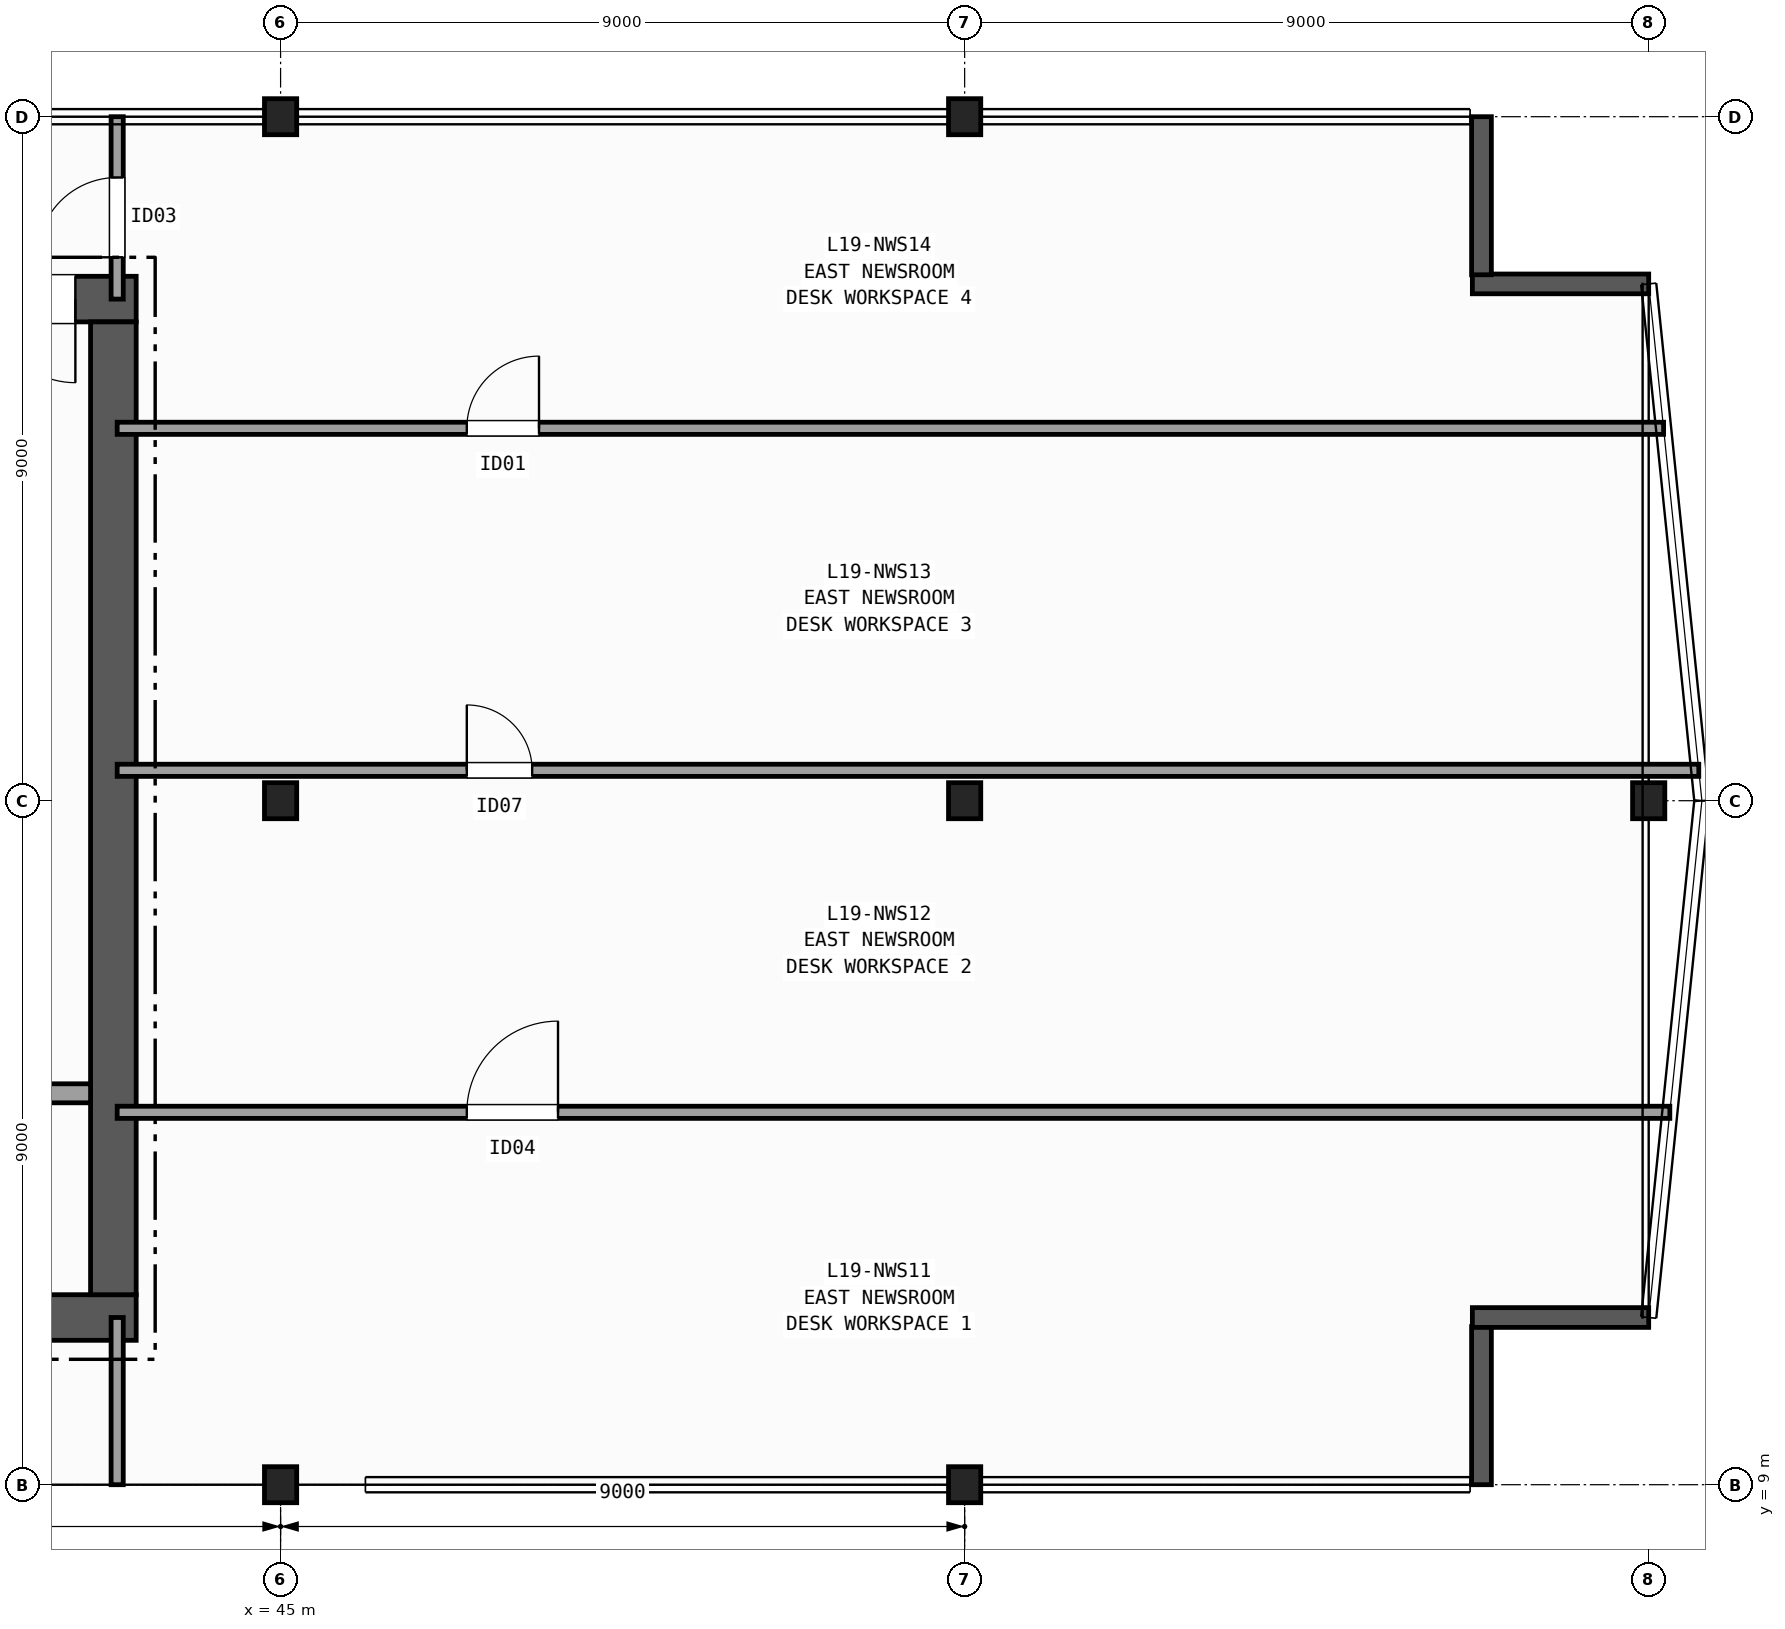
"""IFC4 building model, lengths in metres.
Left out: names, types, materials, properties, quantities, classifications, styles, units other than length and angle.
Written with IfcOpenShell. Run it as: python <this file> out.ifc"""

import sys

from ifc_helpers import new_model, si_unit, direction, frame, frame_2d, origin, origin_2d, place, context, subcontext, project, spatial, rectangle, i_section, extrude, element, fill, save


model = new_model("IFC4")
c1 = context("Model", 3, precision=1e-05, world=origin(), true_north=direction((0.0, 1.0)))
c2 = subcontext(c1, "Body", "Model", "MODEL_VIEW")
j1 = project(units=[si_unit("LENGTHUNIT", "METRE"), si_unit("PLANEANGLEUNIT", "RADIAN")], contexts=[c1])
p1 = place(None, origin())
s1 = spatial("IfcSite", under=j1, at=p1, CompositionType="ELEMENT")
p2 = place(p1, origin())
s2 = spatial("IfcBuilding", under=s1, at=p2, CompositionType="ELEMENT")
p3 = place(p2, frame((0.0, 0.0, 80.4)))
s3 = spatial("IfcBuildingStorey", under=s2, at=p3, CompositionType="ELEMENT", Elevation=80.4)
for number, where, z_axis, x_axis in (
    (1, (45.0, 9.0, 0.0), (0.0, 0.0, 1.0), (1.0, 0.0, 0.0)),
    (2, (45.0, 18.0, 0.0), (0.0, 0.0, 1.0), (1.0, 0.0, 0.0)),
    (3, (45.0, 27.0, 0.0), (0.0, 0.0, 1.0), (1.0, 0.0, 0.0)),
    (4, (54.0, 9.0, 0.0), (0.0, 0.0, 1.0), (1.0, 0.0, 0.0)),
    (5, (54.0, 18.0, 0.0), (0.0, 0.0, 1.0), (1.0, 0.0, 0.0)),
    (6, (54.0, 27.0, 0.0), (0.0, 0.0, 1.0), (1.0, 0.0, 0.0)),
    (7, (63.0, 18.0, 0.0), (0.0, 0.0, 1.0), (1.0, 0.0, 0.0)),
):
    element("IfcColumn", number, at=place(p3, frame(where, z_axis=z_axis, x_axis=x_axis)), inside=s3, PredefinedType="COLUMN", context=c2, shape_type="SweptSolid", body=[
        extrude(i_section(OverallWidth=0.424, OverallDepth=0.474, WebThickness=0.048, FlangeThickness=0.077, FilletRadius=0.015, at=origin_2d()), origin(), (0.0, 0.0, 1.0), 3.7),
    ])
p4 = place(p3, frame((60.8, 9.0, 0.0), z_axis=(0.0, 0.0, 1.0), x_axis=(0.0, 1.0, 0.0)))
e8 = element("IfcWall", 8, at=p4, inside=s3, PredefinedType="SOLIDWALL", context=c2, shape_type="SweptSolid", body=[
    extrude(rectangle(XDim=2.08, YDim=0.26, at=frame_2d((1.04, 0.0))), origin(), (0.0, 0.0, 1.0), 3.37),
])
for number, where, z_axis, x_axis in (
    (9, (60.68, 11.2, 0.0), (0.0, 0.0, 1.0), (1.0, 0.0, 0.0)),
    (10, (63.0, 24.8, 0.0), (0.0, 0.0, 1.0), (-1.0, 0.0, 0.0)),
):
    element("IfcWall", number, at=place(p3, frame(where, z_axis=z_axis, x_axis=x_axis)), inside=s3, PredefinedType="SOLIDWALL", context=c2, shape_type="SweptSolid", body=[
        extrude(rectangle(XDim=2.32, YDim=0.26, at=frame_2d((1.16, 0.0))), origin(), (0.0, 0.0, 1.0), 3.37),
    ])
p5 = place(p3, frame((60.8, 24.92, 0.0), z_axis=(0.0, 0.0, 1.0), x_axis=(0.0, 1.0, 0.0)))
e11 = element("IfcWall", 11, at=p5, inside=s3, PredefinedType="SOLIDWALL", context=c2, shape_type="SweptSolid", body=[
    extrude(rectangle(XDim=2.08, YDim=0.26, at=frame_2d((1.04, 0.0))), origin(), (0.0, 0.0, 1.0), 3.37),
])
p6 = place(p3, frame((29.1, 11.2, 0.0), z_axis=(0.0, 0.0, 1.0), x_axis=(1.0, 0.0, 0.0)))
e12 = element("IfcWall", 12, at=p6, inside=s3, PredefinedType="SHEAR", context=c2, shape_type="SweptSolid", body=[
    extrude(rectangle(XDim=14.0, YDim=0.6, at=frame_2d((7.0, 0.0))), origin(), (0.0, 0.0, 1.0), 3.37),
])
p7 = place(p3, frame((43.1, 24.6, 0.0), z_axis=(0.0, 0.0, 1.0), x_axis=(-1.0, 0.0, 0.0)))
e13 = element("IfcWall", 13, at=p7, inside=s3, PredefinedType="SHEAR", context=c2, shape_type="SweptSolid", body=[
    extrude(rectangle(XDim=14.0, YDim=0.6, at=frame_2d((7.0, 0.0))), origin(), (0.0, 0.0, 1.0), 3.37),
])
p8 = place(p7, frame((0.8, 0.0, 0.0)))
e14 = element("IfcOpeningElement", 14, at=p8, cuts=e13, PredefinedType="OPENING", context=c2, shape_type="SweptSolid", body=[
    extrude(rectangle(XDim=1.1, YDim=2.15, at=frame_2d((0.55, 1.075))), frame((0.0, 0.31, 0.0), z_axis=(0.0, -1.0, 0.0), x_axis=(1.0, 0.0, 0.0)), (0.0, 0.0, 1.0), 0.62),
])
p9 = place(p7, frame((2.75, 0.0, 0.0)))
e15 = element("IfcOpeningElement", 15, at=p9, cuts=e13, PredefinedType="OPENING", context=c2, shape_type="SweptSolid", body=[
    extrude(rectangle(XDim=0.9, YDim=2.1, at=frame_2d((0.45, 1.05))), frame((0.0, 0.31, 0.0), z_axis=(0.0, -1.0, 0.0), x_axis=(1.0, 0.0, 0.0)), (0.0, 0.0, 1.0), 0.62),
])
p10 = place(p7, frame((4.65, 0.0, 0.0)))
e16 = element("IfcOpeningElement", 16, at=p10, cuts=e13, PredefinedType="OPENING", context=c2, shape_type="SweptSolid", body=[
    extrude(rectangle(XDim=0.9, YDim=2.1, at=frame_2d((0.45, 1.05))), frame((0.0, 0.31, 0.0), z_axis=(0.0, -1.0, 0.0), x_axis=(1.0, 0.0, 0.0)), (0.0, 0.0, 1.0), 0.62),
])
p11 = place(p3, frame((42.8, 11.5, 0.0), z_axis=(0.0, 0.0, 1.0), x_axis=(0.0, 1.0, 0.0)))
e17 = element("IfcWall", 17, at=p11, inside=s3, PredefinedType="SHEAR", context=c2, shape_type="SweptSolid", body=[
    extrude(rectangle(XDim=12.8, YDim=0.6, at=frame_2d((6.4, 0.0))), origin(), (0.0, 0.0, 1.0), 3.37),
])
p12 = place(p3, frame((33.07, 14.15, 0.0), z_axis=(0.0, 0.0, 1.0), x_axis=(1.0, 0.0, 0.0)))
e18 = element("IfcWall", 18, at=p12, inside=s3, PredefinedType="PARTITIONING", context=c2, shape_type="SweptSolid", body=[
    extrude(rectangle(XDim=9.43, YDim=0.25, at=frame_2d((4.715, 0.0))), origin(), (0.0, 0.0, 1.0), 3.37),
])
p13 = place(p12, frame((0.755, 0.0, 0.0)))
e19 = element("IfcOpeningElement", 19, at=p13, cuts=e18, PredefinedType="OPENING", context=c2, shape_type="SweptSolid", body=[
    extrude(rectangle(XDim=1.15, YDim=2.15, at=frame_2d((0.575, 1.075))), frame((0.0, 0.135, 0.0), z_axis=(0.0, -1.0, 0.0), x_axis=(1.0, 0.0, 0.0)), (0.0, 0.0, 1.0), 0.27),
])
p14 = place(p12, frame((3.355, 0.0, 0.0)))
e20 = element("IfcOpeningElement", 20, at=p14, cuts=e18, PredefinedType="OPENING", context=c2, shape_type="SweptSolid", body=[
    extrude(rectangle(XDim=1.15, YDim=2.15, at=frame_2d((0.575, 1.075))), frame((0.0, 0.135, 0.0), z_axis=(0.0, -1.0, 0.0), x_axis=(1.0, 0.0, 0.0)), (0.0, 0.0, 1.0), 0.27),
])
p15 = place(p3, frame((42.85, 9.0, 0.0), z_axis=(0.0, 0.0, 1.0), x_axis=(0.0, 1.0, 0.0)))
e21 = element("IfcWall", 21, at=p15, inside=s3, PredefinedType="PARTITIONING", context=c2, shape_type="SweptSolid", body=[
    extrude(rectangle(XDim=2.2, YDim=0.16, at=frame_2d((1.1, 0.0))), origin(), (0.0, 0.0, 1.0), 2.577),
])
p16 = place(p3, frame((42.85, 24.6, 0.0), z_axis=(0.0, 0.0, 1.0), x_axis=(0.0, 1.0, 0.0)))
e22 = element("IfcWall", 22, at=p16, inside=s3, PredefinedType="PARTITIONING", context=c2, shape_type="SweptSolid", body=[
    extrude(rectangle(XDim=2.4, YDim=0.16, at=frame_2d((1.2, 0.0))), origin(), (0.0, 0.0, 1.0), 2.577),
])
p17 = place(p16, frame((0.55, 0.0, 0.0)))
e23 = element("IfcOpeningElement", 23, at=p17, cuts=e22, PredefinedType="OPENING", context=c2, shape_type="SweptSolid", body=[
    extrude(rectangle(XDim=1.05, YDim=2.15, at=frame_2d((0.525, 1.075))), frame((0.0, 0.09, 0.0), z_axis=(0.0, -1.0, 0.0), x_axis=(1.0, 0.0, 0.0)), (0.0, 0.0, 1.0), 0.18),
])
p18 = place(p3, frame((42.85, 13.9, 0.0), z_axis=(0.0, 0.0, 1.0), x_axis=(1.0, 0.0, 0.0)))
e24 = element("IfcWall", 24, at=p18, inside=s3, PredefinedType="PARTITIONING", context=c2, shape_type="SweptSolid", body=[
    extrude(rectangle(XDim=20.428, YDim=0.16, at=frame_2d((10.214, 0.0))), origin(), (0.0, 0.0, 1.0), 2.742),
])
p19 = place(p18, frame((4.6, 0.0, 0.0)))
e25 = element("IfcOpeningElement", 25, at=p19, cuts=e24, PredefinedType="OPENING", context=c2, shape_type="SweptSolid", body=[
    extrude(rectangle(XDim=1.2, YDim=2.15, at=frame_2d((0.6, 1.075))), frame((0.0, 0.09, 0.0), z_axis=(0.0, -1.0, 0.0), x_axis=(1.0, 0.0, 0.0)), (0.0, 0.0, 1.0), 0.18),
])
p20 = place(p3, frame((42.85, 18.4, 0.0), z_axis=(0.0, 0.0, 1.0), x_axis=(1.0, 0.0, 0.0)))
e26 = element("IfcWall", 26, at=p20, inside=s3, PredefinedType="PARTITIONING", context=c2, shape_type="SweptSolid", body=[
    extrude(rectangle(XDim=20.809, YDim=0.16, at=frame_2d((10.404, 0.0))), origin(), (0.0, 0.0, 1.0), 2.739),
])
p21 = place(p20, frame((4.6, 0.0, 0.0)))
e27 = element("IfcOpeningElement", 27, at=p21, cuts=e26, PredefinedType="OPENING", context=c2, shape_type="SweptSolid", body=[
    extrude(rectangle(XDim=0.86, YDim=2.05, at=frame_2d((0.43, 1.025))), frame((0.0, 0.09, 0.0), z_axis=(0.0, -1.0, 0.0), x_axis=(1.0, 0.0, 0.0)), (0.0, 0.0, 1.0), 0.18),
])
p22 = place(p3, frame((42.85, 22.9, 0.0), z_axis=(0.0, 0.0, 1.0), x_axis=(1.0, 0.0, 0.0)))
e28 = element("IfcWall", 28, at=p22, inside=s3, PredefinedType="PARTITIONING", context=c2, shape_type="SweptSolid", body=[
    extrude(rectangle(XDim=20.346, YDim=0.16, at=frame_2d((10.173, 0.0))), origin(), (0.0, 0.0, 1.0), 2.739),
])
p23 = place(p22, frame((4.6, 0.0, 0.0)))
e29 = element("IfcOpeningElement", 29, at=p23, cuts=e28, PredefinedType="OPENING", context=c2, shape_type="SweptSolid", body=[
    extrude(rectangle(XDim=0.95, YDim=2.1, at=frame_2d((0.475, 1.05))), frame((0.0, 0.09, 0.0), z_axis=(0.0, -1.0, 0.0), x_axis=(1.0, 0.0, 0.0)), (0.0, 0.0, 1.0), 0.18),
])
p24 = place(p8, origin())
e30 = element("IfcDoor", 30, at=p24, inside=s3, OperationType="SINGLE_SWING_LEFT", PredefinedType="DOOR", context=c2, shape_type="SweptSolid", body=[
    extrude(rectangle(XDim=1.1, YDim=2.15, at=frame_2d((0.55, 1.075))), frame((0.0, 0.025, 0.0), z_axis=(0.0, -1.0, 0.0), x_axis=(1.0, 0.0, 0.0)), (0.0, 0.0, 1.0), 0.05),
])
fill(e14, e30)
p25 = place(p17, origin())
e31 = element("IfcDoor", 31, at=p25, inside=s3, OperationType="SINGLE_SWING_LEFT", PredefinedType="DOOR", context=c2, shape_type="SweptSolid", body=[
    extrude(rectangle(XDim=1.05, YDim=2.15, at=frame_2d((0.525, 1.075))), frame((0.0, 0.025, 0.0), z_axis=(0.0, -1.0, 0.0), x_axis=(1.0, 0.0, 0.0)), (0.0, 0.0, 1.0), 0.05),
])
fill(e23, e31)
p26 = place(p19, origin())
e32 = element("IfcDoor", 32, at=p26, inside=s3, OperationType="SINGLE_SWING_RIGHT", PredefinedType="DOOR", context=c2, shape_type="SweptSolid", body=[
    extrude(rectangle(XDim=1.2, YDim=2.15, at=frame_2d((0.6, 1.075))), frame((0.0, 0.025, 0.0), z_axis=(0.0, -1.0, 0.0), x_axis=(1.0, 0.0, 0.0)), (0.0, 0.0, 1.0), 0.05),
])
fill(e25, e32)
p27 = place(p21, origin())
e33 = element("IfcDoor", 33, at=p27, inside=s3, OperationType="SINGLE_SWING_LEFT", PredefinedType="DOOR", context=c2, shape_type="SweptSolid", body=[
    extrude(rectangle(XDim=0.86, YDim=2.05, at=frame_2d((0.43, 1.025))), frame((0.0, 0.025, 0.0), z_axis=(0.0, -1.0, 0.0), x_axis=(1.0, 0.0, 0.0)), (0.0, 0.0, 1.0), 0.05),
])
fill(e27, e33)
p28 = place(p23, origin())
e34 = element("IfcDoor", 34, at=p28, inside=s3, OperationType="SINGLE_SWING_RIGHT", PredefinedType="DOOR", context=c2, shape_type="SweptSolid", body=[
    extrude(rectangle(XDim=0.95, YDim=2.1, at=frame_2d((0.475, 1.05))), frame((0.0, 0.025, 0.0), z_axis=(0.0, -1.0, 0.0), x_axis=(1.0, 0.0, 0.0)), (0.0, 0.0, 1.0), 0.05),
])
fill(e29, e34)
save(model, sys.argv[1])
